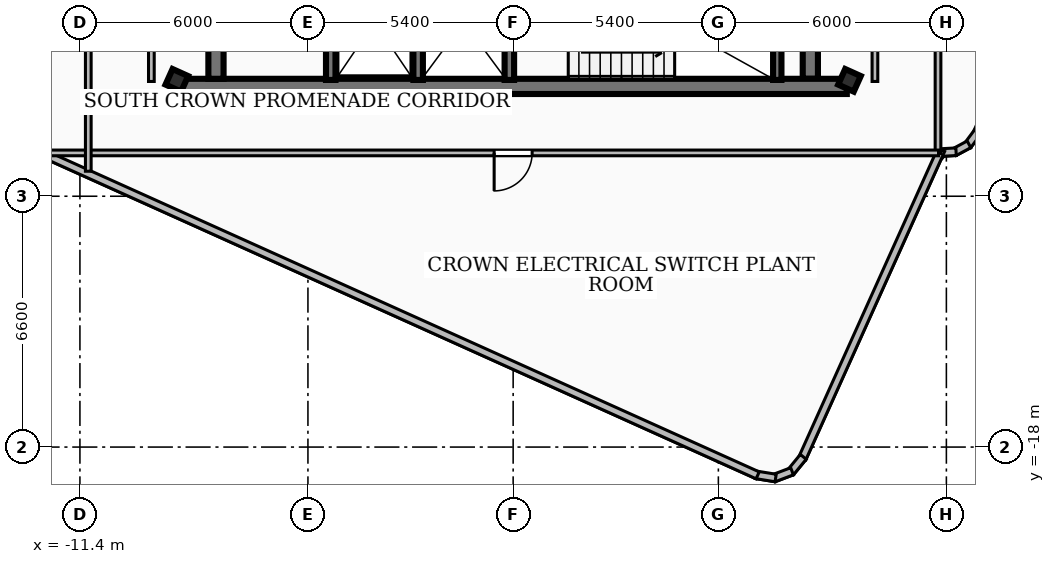
"""IFC4 building model, lengths in metres.
Left out: names, types, materials, properties, quantities, classifications, styles, units other than length and angle.
Written with IfcOpenShell. Run it as: python <this file> out.ifc"""

import sys

from ifc_helpers import new_model, si_unit, direction, frame, frame_2d, origin, origin_2d, place, context, subcontext, project, spatial, rectangle, hollow_rectangle, extrude, element, fill, save


model = new_model("IFC4")
c1 = context("Model", 3, precision=1e-05, world=origin(), true_north=direction((0.0, 1.0)))
c2 = subcontext(c1, "Body", "Model", "MODEL_VIEW")
j1 = project(units=[si_unit("LENGTHUNIT", "METRE"), si_unit("PLANEANGLEUNIT", "RADIAN")], contexts=[c1])
p1 = place(None, origin())
s1 = spatial("IfcSite", under=j1, at=p1, CompositionType="ELEMENT")
p2 = place(p1, origin())
s2 = spatial("IfcBuilding", under=s1, at=p2, CompositionType="ELEMENT")
p3 = place(p2, frame((0.0, 0.0, 297.54)))
s3 = spatial("IfcBuildingStorey", under=s2, at=p3, CompositionType="ELEMENT", Elevation=297.54)
p4 = place(p3, frame((8.78, -8.51, 0.0), z_axis=(0.0, 0.0, 1.0), x_axis=(-1.0, 0.0, 0.0)))
e1 = element("IfcWall", 1, at=p4, inside=s3, PredefinedType="SHEAR", context=c2, shape_type="SweptSolid", body=[
    extrude(rectangle(XDim=17.56, YDim=0.4, at=frame_2d((8.78, 0.0))), origin(), (0.0, 0.0, 1.0), 3.84),
])
for number, where, z_axis, x_axis in (
    (2, (-7.82, -8.31, 0.0), (0.0, 0.0, 1.0), (0.0, 1.0, 0.0)),
    (3, (7.82, -1.95, 0.0), (0.0, 0.0, 1.0), (0.0, -1.0, 0.0)),
):
    element("IfcWall", number, at=place(p3, frame(where, z_axis=z_axis, x_axis=x_axis)), inside=s3, PredefinedType="SHEAR", context=c2, shape_type="SweptSolid", body=[
        extrude(rectangle(XDim=6.36, YDim=0.4, at=frame_2d((3.18, 0.0))), origin(), (0.0, 0.0, 1.0), 3.84),
    ])
p5 = place(p3, frame((6.95, -8.34, 0.0), z_axis=(0.0, 0.0, 1.0), x_axis=(0.0, 1.0, 0.0)))
e4 = element("IfcWall", 4, at=p5, inside=s3, PredefinedType="SOLIDWALL", context=c2, shape_type="SweptSolid", body=[
    extrude(rectangle(XDim=3.06, YDim=0.22, at=frame_2d((1.53, 0.0))), origin(), (0.0, 0.0, 1.0), 3.84),
])
for number, where, z_axis, x_axis in (
    (5, (-0.1, -8.34, 0.0), (0.0, 0.0, 1.0), (0.0, 1.0, 0.0)),
    (6, (-2.5, -8.34, 0.0), (0.0, 0.0, 1.0), (0.0, 1.0, 0.0)),
    (7, (-4.8, -8.34, 0.0), (0.0, 0.0, 1.0), (0.0, 1.0, 0.0)),
):
    element("IfcWall", number, at=place(p3, frame(where, z_axis=z_axis, x_axis=x_axis)), inside=s3, PredefinedType="SOLIDWALL", context=c2, shape_type="SweptSolid", body=[
        extrude(rectangle(XDim=3.04, YDim=0.25, at=frame_2d((1.52, 0.0))), origin(), (0.0, 0.0, 1.0), 3.84),
    ])
for number, where, z_axis, x_axis in (
    (8, (8.85, -8.35, 0.0), (0.0, 0.0, 1.0), (0.411, 0.912, 0.0)),
    (9, (-8.85, -8.35, 0.0), (0.0, 0.0, 1.0), (0.411, 0.912, 0.0)),
):
    element("IfcColumn", number, at=place(p3, frame(where, z_axis=z_axis, x_axis=x_axis)), inside=s3, PredefinedType="COLUMN", context=c2, shape_type="SweptSolid", body=[
        extrude(hollow_rectangle(XDim=0.45, YDim=0.45, WallThickness=0.022, at=origin_2d()), origin(), (0.0, 0.0, 1.0), 4.14),
    ])
p6 = place(p3, frame((15.387, -2.673, 0.0), z_axis=(0.0, 0.0, 1.0), x_axis=(-0.41050728393, -0.911857318795, 0.0)))
e10 = element("IfcWall", 10, at=p6, inside=s3, PredefinedType="SOLIDWALL", context=c2, shape_type="SweptSolid", body=[
    extrude(rectangle(XDim=7.759, YDim=0.2, at=frame_2d((3.879, 0.0))), origin(), (0.0, 0.0, 1.0), 3.84),
])
p7 = place(p3, frame((12.227, -9.705, 0.0), z_axis=(0.0, 0.0, 1.0), x_axis=(-0.597741167546, -0.801689152116, 0.0)))
e11 = element("IfcWall", 11, at=p7, inside=s3, PredefinedType="SOLIDWALL", context=c2, shape_type="SweptSolid", body=[
    extrude(rectangle(XDim=0.45, YDim=0.2, at=frame_2d((0.225, 0.0))), origin(), (0.0, 0.0, 1.0), 3.84),
])
p8 = place(p3, frame((11.995, -10.034, 0.0), z_axis=(0.0, 0.0, 1.0), x_axis=(-0.880934398169, -0.473238403052, 0.0)))
e12 = element("IfcWall", 12, at=p8, inside=s3, PredefinedType="SOLIDWALL", context=c2, shape_type="SweptSolid", body=[
    extrude(rectangle(XDim=0.439, YDim=0.2, at=frame_2d((0.22, 0.0))), origin(), (0.0, 0.0, 1.0), 3.84),
])
p9 = place(p3, frame((11.655, -10.229, 0.0), z_axis=(0.0, 0.0, 1.0), x_axis=(-0.998558429255, -0.053675537844, 0.0)))
e13 = element("IfcWall", 13, at=p9, inside=s3, PredefinedType="SOLIDWALL", context=c2, shape_type="SweptSolid", body=[
    extrude(rectangle(XDim=0.505, YDim=0.2, at=frame_2d((0.252, 0.0))), origin(), (0.0, 0.0, 1.0), 3.84),
])
p10 = place(p3, frame((11.264, -10.179, 0.0), z_axis=(0.0, 0.0, 1.0), x_axis=(-0.410547059118, -0.911839411437, 0.0)))
e14 = element("IfcWall", 14, at=p10, inside=s3, PredefinedType="SOLIDWALL", context=c2, shape_type="SweptSolid", body=[
    extrude(rectangle(XDim=8.905, YDim=0.2, at=frame_2d((4.453, 0.0))), origin(), (0.0, 0.0, 1.0), 3.84),
])
p11 = place(p3, frame((7.634, -18.257, 0.0), z_axis=(0.0, 0.0, 1.0), x_axis=(-0.63346470779, -0.773771583857, 0.0)))
e15 = element("IfcWall", 15, at=p11, inside=s3, PredefinedType="SOLIDWALL", context=c2, shape_type="SweptSolid", body=[
    extrude(rectangle(XDim=0.527, YDim=0.2, at=frame_2d((0.264, 0.0))), origin(), (0.0, 0.0, 1.0), 3.84),
])
p12 = place(p3, frame((7.339, -18.637, 0.0), z_axis=(0.0, 0.0, 1.0), x_axis=(-0.935013831521, -0.354611244695, 0.0)))
e16 = element("IfcWall", 16, at=p12, inside=s3, PredefinedType="SOLIDWALL", context=c2, shape_type="SweptSolid", body=[
    extrude(rectangle(XDim=0.514, YDim=0.2, at=frame_2d((0.257, 0.0))), origin(), (0.0, 0.0, 1.0), 3.84),
])
p13 = place(p3, frame((6.907, -18.814, 0.0), z_axis=(0.0, 0.0, 1.0), x_axis=(-0.987255192858, 0.159145166984, 0.0)))
e17 = element("IfcWall", 17, at=p13, inside=s3, PredefinedType="SOLIDWALL", context=c2, shape_type="SweptSolid", body=[
    extrude(rectangle(XDim=0.528, YDim=0.2, at=frame_2d((0.264, 0.0))), origin(), (0.0, 0.0, 1.0), 3.84),
])
p14 = place(p3, frame((6.434, -18.744, 0.0), z_axis=(0.0, 0.0, 1.0), x_axis=(-0.911837784954, 0.410550671574, 0.0)))
e18 = element("IfcWall", 18, at=p14, inside=s3, PredefinedType="SOLIDWALL", context=c2, shape_type="SweptSolid", body=[
    extrude(rectangle(XDim=27.125, YDim=0.2, at=frame_2d((13.562, 0.0))), origin(), (0.0, 0.0, 1.0), 3.84),
])
p15 = place(p3, frame((-9.52, -8.38, 0.0), z_axis=(0.0, 0.0, 1.0), x_axis=(0.0, 1.0, 0.0)))
e19 = element("IfcWall", 19, at=p15, inside=s3, PredefinedType="PARTITIONING", context=c2, shape_type="SweptSolid", body=[
    extrude(rectangle(XDim=6.63, YDim=0.15, at=frame_2d((3.315, 0.0))), origin(), (0.0, 0.0, 1.0), 3.84),
])
p16 = place(p3, frame((9.52, -8.38, 0.0), z_axis=(0.0, 0.0, 1.0), x_axis=(0.0, 1.0, 0.0)))
e20 = element("IfcWall", 20, at=p16, inside=s3, PredefinedType="PARTITIONING", context=c2, shape_type="SweptSolid", body=[
    extrude(rectangle(XDim=6.63, YDim=0.15, at=frame_2d((3.315, 0.0))), origin(), (0.0, 0.0, 1.0), 3.21),
])
p17 = place(p3, frame((11.18, 10.742, 0.0), z_axis=(0.0, 0.0, 1.0), x_axis=(0.0, -1.0, 0.0)))
e21 = element("IfcWall", 21, at=p17, inside=s3, PredefinedType="PARTITIONING", context=c2, shape_type="SweptSolid", body=[
    extrude(rectangle(XDim=21.02, YDim=0.15, at=frame_2d((10.51, 0.0))), origin(), (0.0, 0.0, 1.0), 3.21),
])
p18 = place(p17, frame((10.242, 0.0, 0.0)))
e22 = element("IfcOpeningElement", 22, at=p18, cuts=e21, PredefinedType="OPENING", context=c2, shape_type="SweptSolid", body=[
    extrude(rectangle(XDim=1.0, YDim=2.1, at=frame_2d((0.5, 1.05))), frame((0.0, 0.085, 0.0), z_axis=(0.0, -1.0, 0.0), x_axis=(1.0, 0.0, 0.0)), (0.0, 0.0, 1.0), 0.17),
])
p19 = place(p3, frame((-11.18, -10.742, 0.0), z_axis=(0.0, 0.0, 1.0), x_axis=(0.0, 1.0, 0.0)))
e23 = element("IfcWall", 23, at=p19, inside=s3, PredefinedType="PARTITIONING", context=c2, shape_type="SweptSolid", body=[
    extrude(rectangle(XDim=21.02, YDim=0.15, at=frame_2d((10.51, 0.0))), origin(), (0.0, 0.0, 1.0), 3.21),
])
p20 = place(p19, frame((8.642, 0.0, 0.0)))
e24 = element("IfcOpeningElement", 24, at=p20, cuts=e23, PredefinedType="OPENING", context=c2, shape_type="SweptSolid", body=[
    extrude(rectangle(XDim=1.0, YDim=2.1, at=frame_2d((0.5, 1.05))), frame((0.0, 0.085, 0.0), z_axis=(0.0, -1.0, 0.0), x_axis=(1.0, 0.0, 0.0)), (0.0, 0.0, 1.0), 0.17),
])
p21 = place(p3, frame((11.194, -10.26, 0.0), z_axis=(0.0, 0.0, 1.0), x_axis=(-1.0, 0.0, 0.0)))
e25 = element("IfcWall", 25, at=p21, inside=s3, PredefinedType="PARTITIONING", context=c2, shape_type="SweptSolid", body=[
    extrude(rectangle(XDim=23.445, YDim=0.15, at=frame_2d((11.723, 0.0))), origin(), (0.0, 0.0, 1.0), 3.21),
])
p22 = place(p21, frame((10.694, 0.0, 0.0)))
e26 = element("IfcOpeningElement", 26, at=p22, cuts=e25, PredefinedType="OPENING", context=c2, shape_type="SweptSolid", body=[
    extrude(rectangle(XDim=1.0, YDim=2.1, at=frame_2d((0.5, 1.05))), frame((0.0, 0.085, 0.0), z_axis=(0.0, -1.0, 0.0), x_axis=(1.0, 0.0, 0.0)), (0.0, 0.0, 1.0), 0.17),
])
p23 = place(p22, origin())
e27 = element("IfcDoor", 27, at=p23, inside=s3, OperationType="SINGLE_SWING_RIGHT", PredefinedType="DOOR", context=c2, shape_type="SweptSolid", body=[
    extrude(rectangle(XDim=1.0, YDim=2.1, at=frame_2d((0.5, 1.05))), frame((0.0, 0.025, 0.0), z_axis=(0.0, -1.0, 0.0), x_axis=(1.0, 0.0, 0.0)), (0.0, 0.0, 1.0), 0.05),
])
fill(e26, e27)
save(model, sys.argv[1])
